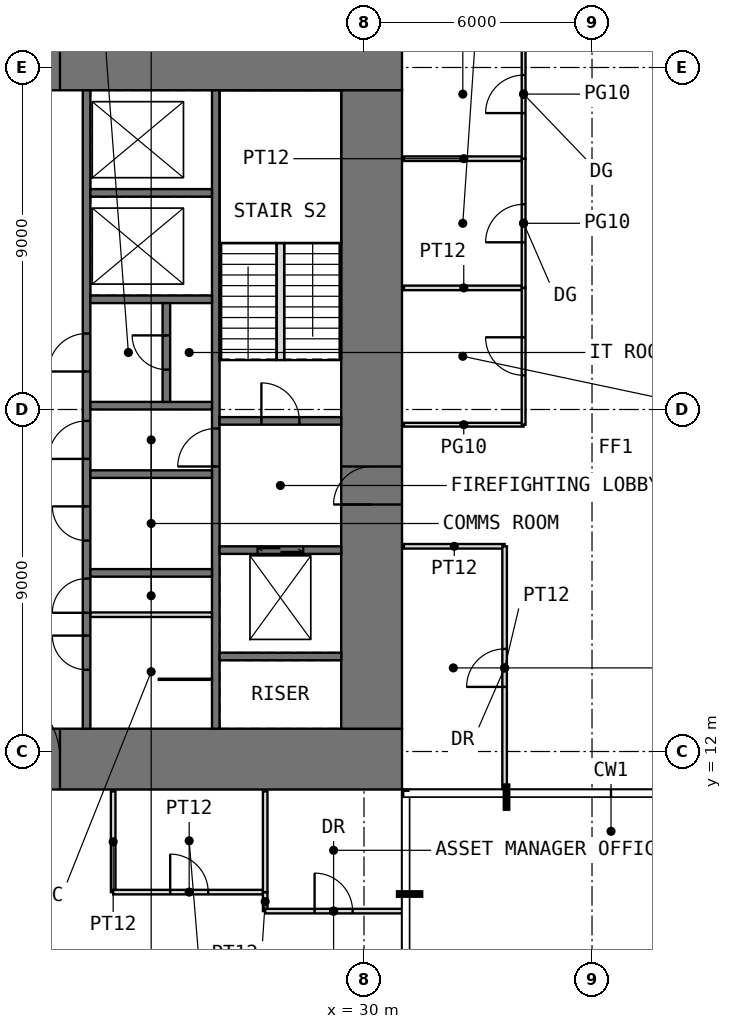
"""IFC4 building model, lengths in metres.
Left out: names, types, materials, properties, quantities, classifications, styles, units other than length and angle.
Written with IfcOpenShell. Run it as: python <this file> out.ifc"""

import sys

from ifc_helpers import new_model, si_unit, direction, frame, frame_2d, origin, place, context, subcontext, project, spatial, rectangle, extrude, element, fill, save


model = new_model("IFC4")
c1 = context("Model", 3, precision=1e-05, world=origin(), true_north=direction((0.0, 1.0)))
c2 = subcontext(c1, "Body", "Model", "MODEL_VIEW")
j1 = project(units=[si_unit("LENGTHUNIT", "METRE"), si_unit("PLANEANGLEUNIT", "RADIAN")], contexts=[c1])
p1 = place(None, origin())
s1 = spatial("IfcSite", under=j1, at=p1, CompositionType="ELEMENT")
p2 = place(p1, origin())
s2 = spatial("IfcBuilding", under=s1, at=p2, CompositionType="ELEMENT")
p3 = place(p2, frame((0.0, 0.0, 132.5)))
s3 = spatial("IfcBuildingStorey", under=s2, at=p3, CompositionType="ELEMENT", Elevation=132.5)
p4 = place(p3, frame((11.0, 11.8, -0.05), z_axis=(0.0, 0.0, 1.0), x_axis=(1.0, 0.0, 0.0)))
e1 = element("IfcWall", 1, at=p4, inside=s3, PredefinedType="SHEAR", context=c2, shape_type="SweptSolid", body=[
    extrude(rectangle(XDim=20.0, YDim=1.6, at=frame_2d((10.0, 0.0))), origin(), (0.0, 0.0, 1.0), 4.0),
])
p5 = place(p4, frame((9.0, 0.0, 0.05)))
e2 = element("IfcOpeningElement", 2, at=p5, cuts=e1, PredefinedType="OPENING", context=c2, shape_type="SweptSolid", body=[
    extrude(rectangle(XDim=2.0, YDim=2.2, at=frame_2d((1.0, 1.1))), frame((0.0, 0.81, 0.0), z_axis=(0.0, -1.0, 0.0), x_axis=(1.0, 0.0, 0.0)), (0.0, 0.0, 1.0), 1.62),
])
p6 = place(p3, frame((11.0, 30.2, -0.05), z_axis=(0.0, 0.0, 1.0), x_axis=(1.0, 0.0, 0.0)))
e3 = element("IfcWall", 3, at=p6, inside=s3, PredefinedType="SHEAR", context=c2, shape_type="SweptSolid", body=[
    extrude(rectangle(XDim=20.0, YDim=1.6, at=frame_2d((10.0, 0.0))), origin(), (0.0, 0.0, 1.0), 4.0),
])
p7 = place(p6, frame((9.0, 0.0, 0.05)))
e4 = element("IfcOpeningElement", 4, at=p7, cuts=e3, PredefinedType="OPENING", context=c2, shape_type="SweptSolid", body=[
    extrude(rectangle(XDim=2.0, YDim=2.2, at=frame_2d((1.0, 1.1))), frame((0.0, 0.81, 0.0), z_axis=(0.0, -1.0, 0.0), x_axis=(1.0, 0.0, 0.0)), (0.0, 0.0, 1.0), 1.62),
])
p8 = place(p3, frame((30.2, 12.6, -0.05), z_axis=(0.0, 0.0, 1.0), x_axis=(0.0, 1.0, 0.0)))
e5 = element("IfcWall", 5, at=p8, inside=s3, PredefinedType="SHEAR", context=c2, shape_type="SweptSolid", body=[
    extrude(rectangle(XDim=16.8, YDim=1.6, at=frame_2d((8.4, 0.0))), origin(), (0.0, 0.0, 1.0), 4.0),
])
p9 = place(p8, frame((5.9, 0.0, 0.05)))
e6 = element("IfcOpeningElement", 6, at=p9, cuts=e5, PredefinedType="OPENING", context=c2, shape_type="SweptSolid", body=[
    extrude(rectangle(XDim=1.0, YDim=2.2, at=frame_2d((0.5, 1.1))), frame((0.0, 0.81, 0.0), z_axis=(0.0, -1.0, 0.0), x_axis=(1.0, 0.0, 0.0)), (0.0, 0.0, 1.0), 1.62),
])
p10 = place(p3, frame((22.7, 12.6, -0.05), z_axis=(0.0, 0.0, 1.0), x_axis=(0.0, 1.0, 0.0)))
e7 = element("IfcWall", 7, at=p10, inside=s3, PredefinedType="SHEAR", context=c2, shape_type="SweptSolid", body=[
    extrude(rectangle(XDim=16.8, YDim=0.2, at=frame_2d((8.4, 0.0))), origin(), (0.0, 0.0, 1.0), 4.0),
])
p11 = place(p10, frame((3.05, 0.0, 0.05)))
e8 = element("IfcOpeningElement", 8, at=p11, cuts=e7, PredefinedType="OPENING", context=c2, shape_type="SweptSolid", body=[
    extrude(rectangle(XDim=0.9, YDim=2.2, at=frame_2d((0.45, 1.1))), frame((0.0, 0.11, 0.0), z_axis=(0.0, -1.0, 0.0), x_axis=(1.0, 0.0, 0.0)), (0.0, 0.0, 1.0), 0.22),
])
p12 = place(p10, frame((7.1, 0.0, 0.05)))
e9 = element("IfcOpeningElement", 9, at=p12, cuts=e7, PredefinedType="OPENING", context=c2, shape_type="SweptSolid", body=[
    extrude(rectangle(XDim=1.0, YDim=2.2, at=frame_2d((0.5, 1.1))), frame((0.0, 0.11, 0.0), z_axis=(0.0, -1.0, 0.0), x_axis=(1.0, 0.0, 0.0)), (0.0, 0.0, 1.0), 0.22),
])
p13 = place(p10, frame((1.55, 0.0, 0.05)))
e10 = element("IfcOpeningElement", 10, at=p13, cuts=e7, PredefinedType="OPENING", context=c2, shape_type="SweptSolid", body=[
    extrude(rectangle(XDim=0.9, YDim=2.2, at=frame_2d((0.45, 1.1))), frame((0.0, 0.11, 0.0), z_axis=(0.0, -1.0, 0.0), x_axis=(1.0, 0.0, 0.0)), (0.0, 0.0, 1.0), 0.22),
])
p14 = place(p10, frame((4.95, 0.0, 0.05)))
e11 = element("IfcOpeningElement", 11, at=p14, cuts=e7, PredefinedType="OPENING", context=c2, shape_type="SweptSolid", body=[
    extrude(rectangle(XDim=0.9, YDim=2.2, at=frame_2d((0.45, 1.1))), frame((0.0, 0.11, 0.0), z_axis=(0.0, -1.0, 0.0), x_axis=(1.0, 0.0, 0.0)), (0.0, 0.0, 1.0), 0.22),
])
p15 = place(p10, frame((9.4, 0.0, 0.05)))
e12 = element("IfcOpeningElement", 12, at=p15, cuts=e7, PredefinedType="OPENING", context=c2, shape_type="SweptSolid", body=[
    extrude(rectangle(XDim=1.0, YDim=2.2, at=frame_2d((0.5, 1.1))), frame((0.0, 0.11, 0.0), z_axis=(0.0, -1.0, 0.0), x_axis=(1.0, 0.0, 0.0)), (0.0, 0.0, 1.0), 0.22),
])
p16 = place(p3, frame((26.1, 12.6, -0.05), z_axis=(0.0, 0.0, 1.0), x_axis=(0.0, 1.0, 0.0)))
e13 = element("IfcWall", 13, at=p16, inside=s3, PredefinedType="SHEAR", context=c2, shape_type="SweptSolid", body=[
    extrude(rectangle(XDim=16.8, YDim=0.2, at=frame_2d((8.4, 0.0))), origin(), (0.0, 0.0, 1.0), 4.0),
])
p17 = place(p16, frame((6.9, 0.0, 0.05)))
e14 = element("IfcOpeningElement", 14, at=p17, cuts=e13, PredefinedType="OPENING", context=c2, shape_type="SweptSolid", body=[
    extrude(rectangle(XDim=1.0, YDim=2.2, at=frame_2d((0.5, 1.1))), frame((0.0, 0.11, 0.0), z_axis=(0.0, -1.0, 0.0), x_axis=(1.0, 0.0, 0.0)), (0.0, 0.0, 1.0), 0.22),
])
for number, where, z_axis, x_axis in (
    (15, (22.8, 16.7, -0.05), (0.0, 0.0, 1.0), (1.0, 0.0, 0.0)),
    (16, (22.8, 19.3, -0.05), (0.0, 0.0, 1.0), (1.0, 0.0, 0.0)),
    (17, (22.8, 21.1, -0.05), (0.0, 0.0, 1.0), (1.0, 0.0, 0.0)),
    (18, (22.8, 23.9, -0.05), (0.0, 0.0, 1.0), (1.0, 0.0, 0.0)),
    (19, (22.8, 26.7, -0.05), (0.0, 0.0, 1.0), (1.0, 0.0, 0.0)),
    (20, (26.2, 14.5, -0.05), (0.0, 0.0, 1.0), (1.0, 0.0, 0.0)),
):
    element("IfcWall", number, at=place(p3, frame(where, z_axis=z_axis, x_axis=x_axis)), inside=s3, PredefinedType="SHEAR", context=c2, shape_type="SweptSolid", body=[
        extrude(rectangle(XDim=3.2, YDim=0.2, at=frame_2d((1.6, 0.0))), origin(), (0.0, 0.0, 1.0), 4.0),
    ])
p18 = place(p3, frame((26.2, 17.3, -0.05), z_axis=(0.0, 0.0, 1.0), x_axis=(1.0, 0.0, 0.0)))
e21 = element("IfcWall", 21, at=p18, inside=s3, PredefinedType="SHEAR", context=c2, shape_type="SweptSolid", body=[
    extrude(rectangle(XDim=3.2, YDim=0.2, at=frame_2d((1.6, 0.0))), origin(), (0.0, 0.0, 1.0), 4.0),
])
p19 = place(p18, frame((1.0, 0.0, 0.05)))
e22 = element("IfcOpeningElement", 22, at=p19, cuts=e21, PredefinedType="OPENING", context=c2, shape_type="SweptSolid", body=[
    extrude(rectangle(XDim=1.2, YDim=2.2, at=frame_2d((0.6, 1.1))), frame((0.0, 0.11, 0.0), z_axis=(0.0, -1.0, 0.0), x_axis=(1.0, 0.0, 0.0)), (0.0, 0.0, 1.0), 0.22),
])
p20 = place(p3, frame((26.2, 20.7, -0.05), z_axis=(0.0, 0.0, 1.0), x_axis=(1.0, 0.0, 0.0)))
e23 = element("IfcWall", 23, at=p20, inside=s3, PredefinedType="SHEAR", context=c2, shape_type="SweptSolid", body=[
    extrude(rectangle(XDim=3.2, YDim=0.2, at=frame_2d((1.6, 0.0))), origin(), (0.0, 0.0, 1.0), 4.0),
])
p21 = place(p20, frame((1.1, 0.0, 0.05)))
e24 = element("IfcOpeningElement", 24, at=p21, cuts=e23, PredefinedType="OPENING", context=c2, shape_type="SweptSolid", body=[
    extrude(rectangle(XDim=1.0, YDim=2.2, at=frame_2d((0.5, 1.1))), frame((0.0, 0.11, 0.0), z_axis=(0.0, -1.0, 0.0), x_axis=(1.0, 0.0, 0.0)), (0.0, 0.0, 1.0), 0.22),
])
p22 = place(p3, frame((22.8, 15.6, 0.0), z_axis=(0.0, 0.0, 1.0), x_axis=(1.0, 0.0, 0.0)))
e25 = element("IfcWall", 25, at=p22, inside=s3, PredefinedType="PARTITIONING", context=c2, shape_type="SweptSolid", body=[
    extrude(rectangle(XDim=3.2, YDim=0.12, at=frame_2d((1.6, 0.0))), origin(), (0.0, 0.0, 1.0), 3.75),
])
p23 = place(p3, frame((24.6, 13.9, 0.0), z_axis=(0.0, 0.0, 1.0), x_axis=(1.0, 0.0, 0.0)))
e26 = element("IfcWall", 26, at=p23, inside=s3, PredefinedType="PARTITIONING", context=c2, shape_type="SweptSolid", body=[
    extrude(rectangle(XDim=1.4, YDim=0.03, at=frame_2d((0.7, 0.0))), origin(), (0.0, 0.0, 1.0), 3.75),
])
p24 = place(p3, frame((24.8, 21.2, -0.05), z_axis=(0.0, 0.0, 1.0), x_axis=(0.0, 1.0, 0.0)))
e27 = element("IfcWall", 27, at=p24, inside=s3, PredefinedType="SHEAR", context=c2, shape_type="SweptSolid", body=[
    extrude(rectangle(XDim=2.6, YDim=0.2, at=frame_2d((1.3, 0.0))), origin(), (0.0, 0.0, 1.0), 4.0),
])
p25 = place(p24, frame((0.85, 0.0, 0.05)))
e28 = element("IfcOpeningElement", 28, at=p25, cuts=e27, PredefinedType="OPENING", context=c2, shape_type="SweptSolid", body=[
    extrude(rectangle(XDim=0.9, YDim=2.2, at=frame_2d((0.45, 1.1))), frame((0.0, 0.11, 0.0), z_axis=(0.0, -1.0, 0.0), x_axis=(1.0, 0.0, 0.0)), (0.0, 0.0, 1.0), 0.22),
])
p26 = place(p3, frame((23.4, 8.3, 0.0), z_axis=(0.0, 0.0, 1.0), x_axis=(0.0, 1.0, 0.0)))
e29 = element("IfcWall", 29, at=p26, inside=s3, PredefinedType="PARTITIONING", context=c2, shape_type="SweptSolid", body=[
    extrude(rectangle(XDim=2.65, YDim=0.12, at=frame_2d((1.325, 0.0))), origin(), (0.0, 0.0, 1.0), 3.75),
])
p27 = place(p3, frame((23.4, 8.3, 0.0), z_axis=(0.0, 0.0, 1.0), x_axis=(1.0, 0.0, 0.0)))
e30 = element("IfcWall", 30, at=p27, inside=s3, PredefinedType="PARTITIONING", context=c2, shape_type="SweptSolid", body=[
    extrude(rectangle(XDim=4.0, YDim=0.12, at=frame_2d((2.0, 0.0))), origin(), (0.0, 0.0, 1.0), 3.75),
])
p28 = place(p27, frame((1.5, 0.0, 0.0)))
e31 = element("IfcOpeningElement", 31, at=p28, cuts=e30, PredefinedType="OPENING", context=c2, shape_type="SweptSolid", body=[
    extrude(rectangle(XDim=1.0, YDim=2.2, at=frame_2d((0.5, 1.1))), frame((0.0, 0.07, 0.0), z_axis=(0.0, -1.0, 0.0), x_axis=(1.0, 0.0, 0.0)), (0.0, 0.0, 1.0), 0.14),
])
p29 = place(p3, frame((27.4, 7.8, 0.0), z_axis=(0.0, 0.0, 1.0), x_axis=(0.0, 1.0, 0.0)))
e32 = element("IfcWall", 32, at=p29, inside=s3, PredefinedType="PARTITIONING", context=c2, shape_type="SweptSolid", body=[
    extrude(rectangle(XDim=0.5, YDim=0.12, at=frame_2d((0.25, 0.0))), origin(), (0.0, 0.0, 1.0), 3.75),
])
p30 = place(p3, frame((27.4, 7.8, 0.0), z_axis=(0.0, 0.0, 1.0), x_axis=(1.0, 0.0, 0.0)))
e33 = element("IfcWall", 33, at=p30, inside=s3, PredefinedType="PARTITIONING", context=c2, shape_type="SweptSolid", body=[
    extrude(rectangle(XDim=3.6, YDim=0.12, at=frame_2d((1.8, 0.0))), origin(), (0.0, 0.0, 1.0), 3.75),
])
p31 = place(p30, frame((1.3, 0.0, 0.0)))
e34 = element("IfcOpeningElement", 34, at=p31, cuts=e33, PredefinedType="OPENING", context=c2, shape_type="SweptSolid", body=[
    extrude(rectangle(XDim=1.0, YDim=2.2, at=frame_2d((0.5, 1.1))), frame((0.0, 0.07, 0.0), z_axis=(0.0, -1.0, 0.0), x_axis=(1.0, 0.0, 0.0)), (0.0, 0.0, 1.0), 0.14),
])
for number, where, z_axis, x_axis in (
    (35, (27.4, 8.3, 0.0), (0.0, 0.0, 1.0), (0.0, 1.0, 0.0)),
    (36, (31.05, 17.4, 0.0), (0.0, 0.0, 1.0), (1.0, 0.0, 0.0)),
):
    element("IfcWall", number, at=place(p3, frame(where, z_axis=z_axis, x_axis=x_axis)), inside=s3, PredefinedType="PARTITIONING", context=c2, shape_type="SweptSolid", body=[
        extrude(rectangle(XDim=2.65, YDim=0.12, at=frame_2d((1.325, 0.0))), origin(), (0.0, 0.0, 1.0), 3.75),
    ])
p32 = place(p3, frame((31.05, 20.6, 0.0), z_axis=(0.0, 0.0, 1.0), x_axis=(1.0, 0.0, 0.0)))
e37 = element("IfcWall", 37, at=p32, inside=s3, PredefinedType="PARTITIONING", context=c2, shape_type="SweptSolid", body=[
    extrude(rectangle(XDim=3.15, YDim=0.1, at=frame_2d((1.575, 0.0))), origin(), (0.0, 0.0, 1.0), 3.75),
])
for number, where, z_axis, x_axis in (
    (38, (31.05, 24.2, 0.0), (0.0, 0.0, 1.0), (1.0, 0.0, 0.0)),
    (39, (31.05, 27.6, 0.0), (0.0, 0.0, 1.0), (1.0, 0.0, 0.0)),
):
    element("IfcWall", number, at=place(p3, frame(where, z_axis=z_axis, x_axis=x_axis)), inside=s3, PredefinedType="PARTITIONING", context=c2, shape_type="SweptSolid", body=[
        extrude(rectangle(XDim=3.15, YDim=0.12, at=frame_2d((1.575, 0.0))), origin(), (0.0, 0.0, 1.0), 3.75),
    ])
p33 = place(p3, frame((33.7, 11.0, 0.0), z_axis=(0.0, 0.0, 1.0), x_axis=(0.0, 1.0, 0.0)))
e40 = element("IfcWall", 40, at=p33, inside=s3, PredefinedType="PARTITIONING", context=c2, shape_type="SweptSolid", body=[
    extrude(rectangle(XDim=6.4, YDim=0.12, at=frame_2d((3.2, 0.0))), origin(), (0.0, 0.0, 1.0), 3.75),
])
p34 = place(p33, frame((2.7, 0.0, 0.0)))
e41 = element("IfcOpeningElement", 41, at=p34, cuts=e40, PredefinedType="OPENING", context=c2, shape_type="SweptSolid", body=[
    extrude(rectangle(XDim=1.0, YDim=2.2, at=frame_2d((0.5, 1.1))), frame((0.0, 0.07, 0.0), z_axis=(0.0, -1.0, 0.0), x_axis=(1.0, 0.0, 0.0)), (0.0, 0.0, 1.0), 0.14),
])
p35 = place(p3, frame((34.2, 20.6, 0.0), z_axis=(0.0, 0.0, 1.0), x_axis=(0.0, 1.0, 0.0)))
e42 = element("IfcWall", 42, at=p35, inside=s3, PredefinedType="PARTITIONING", context=c2, shape_type="SweptSolid", body=[
    extrude(rectangle(XDim=3.6, YDim=0.1, at=frame_2d((1.8, 0.0))), origin(), (0.0, 0.0, 1.0), 3.75),
])
p36 = place(p35, frame((1.3, 0.0, 0.0)))
e43 = element("IfcOpeningElement", 43, at=p36, cuts=e42, PredefinedType="OPENING", context=c2, shape_type="SweptSolid", body=[
    extrude(rectangle(XDim=1.0, YDim=2.4, at=frame_2d((0.5, 1.2))), frame((0.0, 0.06, 0.0), z_axis=(0.0, -1.0, 0.0), x_axis=(1.0, 0.0, 0.0)), (0.0, 0.0, 1.0), 0.12),
])
p37 = place(p3, frame((34.2, 24.2, 0.0), z_axis=(0.0, 0.0, 1.0), x_axis=(0.0, 1.0, 0.0)))
e44 = element("IfcWall", 44, at=p37, inside=s3, PredefinedType="PARTITIONING", context=c2, shape_type="SweptSolid", body=[
    extrude(rectangle(XDim=3.4, YDim=0.1, at=frame_2d((1.7, 0.0))), origin(), (0.0, 0.0, 1.0), 3.75),
])
p38 = place(p37, frame((1.2, 0.0, 0.0)))
e45 = element("IfcOpeningElement", 45, at=p38, cuts=e44, PredefinedType="OPENING", context=c2, shape_type="SweptSolid", body=[
    extrude(rectangle(XDim=1.0, YDim=2.4, at=frame_2d((0.5, 1.2))), frame((0.0, 0.06, 0.0), z_axis=(0.0, -1.0, 0.0), x_axis=(1.0, 0.0, 0.0)), (0.0, 0.0, 1.0), 0.12),
])
p39 = place(p3, frame((34.2, 27.6, 0.0), z_axis=(0.0, 0.0, 1.0), x_axis=(0.0, 1.0, 0.0)))
e46 = element("IfcWall", 46, at=p39, inside=s3, PredefinedType="PARTITIONING", context=c2, shape_type="SweptSolid", body=[
    extrude(rectangle(XDim=3.4, YDim=0.1, at=frame_2d((1.7, 0.0))), origin(), (0.0, 0.0, 1.0), 3.75),
])
p40 = place(p39, frame((1.2, 0.0, 0.0)))
e47 = element("IfcOpeningElement", 47, at=p40, cuts=e46, PredefinedType="OPENING", context=c2, shape_type="SweptSolid", body=[
    extrude(rectangle(XDim=1.0, YDim=2.4, at=frame_2d((0.5, 1.2))), frame((0.0, 0.06, 0.0), z_axis=(0.0, -1.0, 0.0), x_axis=(1.0, 0.0, 0.0)), (0.0, 0.0, 1.0), 0.12),
])
p41 = place(p3, frame((27.8, 22.3, 0.0), z_axis=(0.0, 0.0, 1.0), x_axis=(0.0, 1.0, 0.0)))
e48 = element("IfcWall", 48, at=p41, inside=s3, PredefinedType="PARTITIONING", context=c2, shape_type="SweptSolid", body=[
    extrude(rectangle(XDim=3.08, YDim=0.2, at=frame_2d((1.54, 0.0))), origin(), (0.0, 0.0, 1.0), 4.0),
])
p42 = place(p5, origin())
e49 = element("IfcDoor", 49, at=p42, inside=s3, OperationType="DOUBLE_DOOR_SINGLE_SWING", PredefinedType="DOOR", context=c2, shape_type="SweptSolid", body=[
    extrude(rectangle(XDim=2.0, YDim=2.2, at=frame_2d((1.0, 1.1))), frame((0.0, 0.025, 0.0), z_axis=(0.0, -1.0, 0.0), x_axis=(1.0, 0.0, 0.0)), (0.0, 0.0, 1.0), 0.05),
])
fill(e2, e49)
p43 = place(p7, origin())
e50 = element("IfcDoor", 50, at=p43, inside=s3, OperationType="DOUBLE_DOOR_SINGLE_SWING", PredefinedType="DOOR", context=c2, shape_type="SweptSolid", body=[
    extrude(rectangle(XDim=2.0, YDim=2.2, at=frame_2d((1.0, 1.1))), frame((0.0, 0.025, 0.0), z_axis=(0.0, -1.0, 0.0), x_axis=(1.0, 0.0, 0.0)), (0.0, 0.0, 1.0), 0.05),
])
fill(e4, e50)
p44 = place(p11, origin())
e51 = element("IfcDoor", 51, at=p44, inside=s3, OperationType="SINGLE_SWING_LEFT", PredefinedType="DOOR", context=c2, shape_type="SweptSolid", body=[
    extrude(rectangle(XDim=0.9, YDim=2.2, at=frame_2d((0.45, 1.1))), frame((0.0, 0.025, 0.0), z_axis=(0.0, -1.0, 0.0), x_axis=(1.0, 0.0, 0.0)), (0.0, 0.0, 1.0), 0.05),
])
fill(e8, e51)
p45 = place(p9, origin())
e52 = element("IfcDoor", 52, at=p45, inside=s3, OperationType="SINGLE_SWING_LEFT", PredefinedType="DOOR", context=c2, shape_type="SweptSolid", body=[
    extrude(rectangle(XDim=1.0, YDim=2.2, at=frame_2d((0.5, 1.1))), frame((0.0, 0.025, 0.0), z_axis=(0.0, -1.0, 0.0), x_axis=(1.0, 0.0, 0.0)), (0.0, 0.0, 1.0), 0.05),
])
fill(e6, e52)
p46 = place(p21, origin())
e53 = element("IfcDoor", 53, at=p46, inside=s3, OperationType="SINGLE_SWING_LEFT", PredefinedType="DOOR", context=c2, shape_type="SweptSolid", body=[
    extrude(rectangle(XDim=1.0, YDim=2.2, at=frame_2d((0.5, 1.1))), frame((0.0, 0.025, 0.0), z_axis=(0.0, -1.0, 0.0), x_axis=(1.0, 0.0, 0.0)), (0.0, 0.0, 1.0), 0.05),
])
fill(e24, e53)
p47 = place(p17, origin())
e54 = element("IfcDoor", 54, at=p47, inside=s3, OperationType="SINGLE_SWING_LEFT", PredefinedType="DOOR", context=c2, shape_type="SweptSolid", body=[
    extrude(rectangle(XDim=1.0, YDim=2.2, at=frame_2d((0.5, 1.1))), frame((0.0, 0.025, 0.0), z_axis=(0.0, -1.0, 0.0), x_axis=(1.0, 0.0, 0.0)), (0.0, 0.0, 1.0), 0.05),
])
fill(e14, e54)
p48 = place(p12, origin())
e55 = element("IfcDoor", 55, at=p48, inside=s3, OperationType="SINGLE_SWING_LEFT", PredefinedType="DOOR", context=c2, shape_type="SweptSolid", body=[
    extrude(rectangle(XDim=1.0, YDim=2.2, at=frame_2d((0.5, 1.1))), frame((0.0, 0.025, 0.0), z_axis=(0.0, -1.0, 0.0), x_axis=(1.0, 0.0, 0.0)), (0.0, 0.0, 1.0), 0.05),
])
fill(e9, e55)
p49 = place(p13, origin())
e56 = element("IfcDoor", 56, at=p49, inside=s3, OperationType="SINGLE_SWING_RIGHT", PredefinedType="DOOR", context=c2, shape_type="SweptSolid", body=[
    extrude(rectangle(XDim=0.9, YDim=2.2, at=frame_2d((0.45, 1.1))), frame((0.0, 0.025, 0.0), z_axis=(0.0, -1.0, 0.0), x_axis=(1.0, 0.0, 0.0)), (0.0, 0.0, 1.0), 0.05),
])
fill(e10, e56)
p50 = place(p14, origin())
e57 = element("IfcDoor", 57, at=p50, inside=s3, OperationType="SINGLE_SWING_RIGHT", PredefinedType="DOOR", context=c2, shape_type="SweptSolid", body=[
    extrude(rectangle(XDim=0.9, YDim=2.2, at=frame_2d((0.45, 1.1))), frame((0.0, 0.025, 0.0), z_axis=(0.0, -1.0, 0.0), x_axis=(1.0, 0.0, 0.0)), (0.0, 0.0, 1.0), 0.05),
])
fill(e11, e57)
p51 = place(p15, origin())
e58 = element("IfcDoor", 58, at=p51, inside=s3, OperationType="SINGLE_SWING_LEFT", PredefinedType="DOOR", context=c2, shape_type="SweptSolid", body=[
    extrude(rectangle(XDim=1.0, YDim=2.2, at=frame_2d((0.5, 1.1))), frame((0.0, 0.025, 0.0), z_axis=(0.0, -1.0, 0.0), x_axis=(1.0, 0.0, 0.0)), (0.0, 0.0, 1.0), 0.05),
])
fill(e12, e58)
p52 = place(p25, origin())
e59 = element("IfcDoor", 59, at=p52, inside=s3, OperationType="SINGLE_SWING_RIGHT", PredefinedType="DOOR", context=c2, shape_type="SweptSolid", body=[
    extrude(rectangle(XDim=0.9, YDim=2.2, at=frame_2d((0.45, 1.1))), frame((0.0, 0.025, 0.0), z_axis=(0.0, -1.0, 0.0), x_axis=(1.0, 0.0, 0.0)), (0.0, 0.0, 1.0), 0.05),
])
fill(e28, e59)
p53 = place(p28, origin())
e60 = element("IfcDoor", 60, at=p53, inside=s3, OperationType="SINGLE_SWING_LEFT", PredefinedType="DOOR", context=c2, shape_type="SweptSolid", body=[
    extrude(rectangle(XDim=1.0, YDim=2.2, at=frame_2d((0.5, 1.1))), frame((0.0, 0.025, 0.0), z_axis=(0.0, -1.0, 0.0), x_axis=(1.0, 0.0, 0.0)), (0.0, 0.0, 1.0), 0.05),
])
fill(e31, e60)
p54 = place(p31, origin())
e61 = element("IfcDoor", 61, at=p54, inside=s3, OperationType="SINGLE_SWING_LEFT", PredefinedType="DOOR", context=c2, shape_type="SweptSolid", body=[
    extrude(rectangle(XDim=1.0, YDim=2.2, at=frame_2d((0.5, 1.1))), frame((0.0, 0.025, 0.0), z_axis=(0.0, -1.0, 0.0), x_axis=(1.0, 0.0, 0.0)), (0.0, 0.0, 1.0), 0.05),
])
fill(e34, e61)
p55 = place(p34, origin())
e62 = element("IfcDoor", 62, at=p55, inside=s3, OperationType="SINGLE_SWING_LEFT", PredefinedType="DOOR", context=c2, shape_type="SweptSolid", body=[
    extrude(rectangle(XDim=1.0, YDim=2.2, at=frame_2d((0.5, 1.1))), frame((0.0, 0.025, 0.0), z_axis=(0.0, -1.0, 0.0), x_axis=(1.0, 0.0, 0.0)), (0.0, 0.0, 1.0), 0.05),
])
fill(e41, e62)
p56 = place(p36, origin())
e63 = element("IfcDoor", 63, at=p56, inside=s3, OperationType="SINGLE_SWING_RIGHT", PredefinedType="DOOR", context=c2, shape_type="SweptSolid", body=[
    extrude(rectangle(XDim=1.0, YDim=2.4, at=frame_2d((0.5, 1.2))), frame((0.0, 0.025, 0.0), z_axis=(0.0, -1.0, 0.0), x_axis=(1.0, 0.0, 0.0)), (0.0, 0.0, 1.0), 0.05),
])
fill(e43, e63)
p57 = place(p38, origin())
e64 = element("IfcDoor", 64, at=p57, inside=s3, OperationType="SINGLE_SWING_LEFT", PredefinedType="DOOR", context=c2, shape_type="SweptSolid", body=[
    extrude(rectangle(XDim=1.0, YDim=2.4, at=frame_2d((0.5, 1.2))), frame((0.0, 0.025, 0.0), z_axis=(0.0, -1.0, 0.0), x_axis=(1.0, 0.0, 0.0)), (0.0, 0.0, 1.0), 0.05),
])
fill(e45, e64)
p58 = place(p40, origin())
e65 = element("IfcDoor", 65, at=p58, inside=s3, OperationType="SINGLE_SWING_LEFT", PredefinedType="DOOR", context=c2, shape_type="SweptSolid", body=[
    extrude(rectangle(XDim=1.0, YDim=2.4, at=frame_2d((0.5, 1.2))), frame((0.0, 0.025, 0.0), z_axis=(0.0, -1.0, 0.0), x_axis=(1.0, 0.0, 0.0)), (0.0, 0.0, 1.0), 0.05),
])
fill(e47, e65)
p59 = place(p19, origin())
e66 = element("IfcDoor", 66, at=p59, inside=s3, OperationType="DOUBLE_DOOR_SLIDING", PredefinedType="DOOR", context=c2, shape_type="SweptSolid", body=[
    extrude(rectangle(XDim=1.2, YDim=2.2, at=frame_2d((0.6, 1.1))), frame((0.0, 0.025, 0.0), z_axis=(0.0, -1.0, 0.0), x_axis=(1.0, 0.0, 0.0)), (0.0, 0.0, 1.0), 0.05),
])
fill(e22, e66)
save(model, sys.argv[1])
